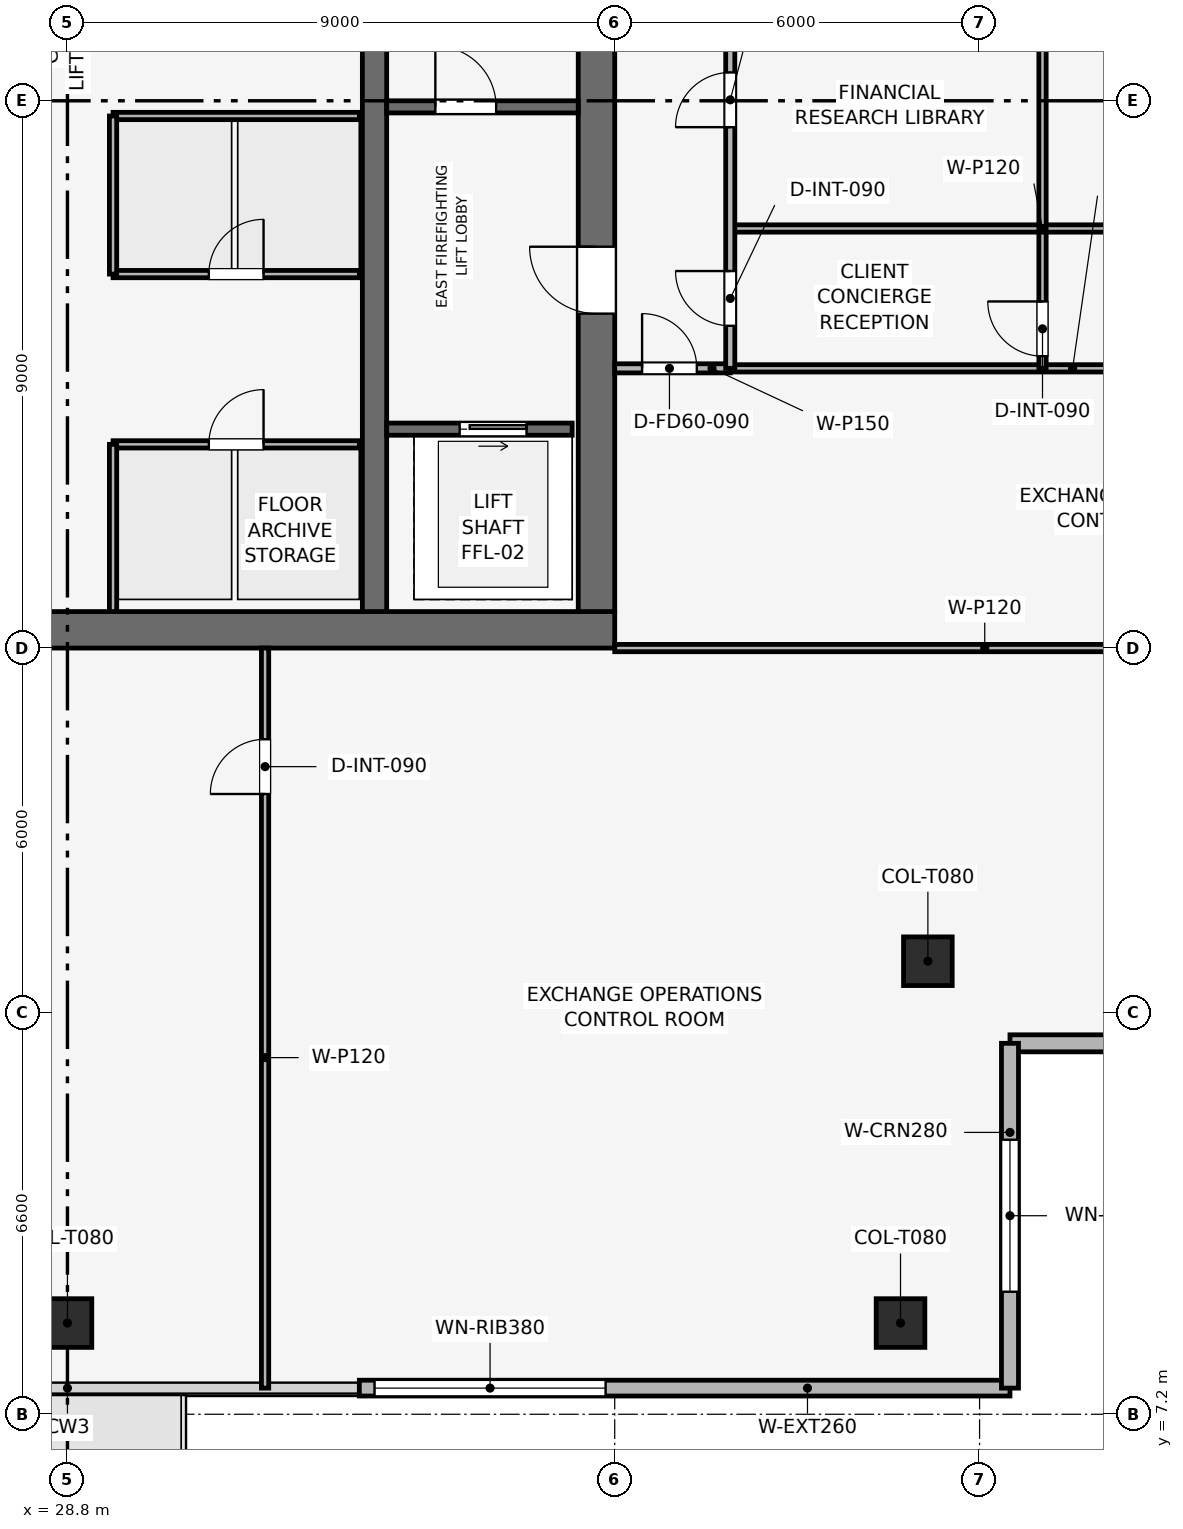
"""IFC4 building model, lengths in metres.
Left out: names, types, materials, properties, quantities, classifications, styles, units other than length and angle.
Written with IfcOpenShell. Run it as: python <this file> out.ifc"""

import sys

from ifc_helpers import new_model, si_unit, direction, frame, frame_2d, origin, origin_2d, place, context, subcontext, project, spatial, rectangle, extrude, element, fill, save


model = new_model("IFC4")
c1 = context("Model", 3, precision=1e-05, world=origin(), true_north=direction((0.0, 1.0)))
c2 = subcontext(c1, "Body", "Model", "MODEL_VIEW")
j1 = project(units=[si_unit("LENGTHUNIT", "METRE"), si_unit("PLANEANGLEUNIT", "RADIAN")], contexts=[c1])
p1 = place(None, origin())
s1 = spatial("IfcSite", under=j1, at=p1, CompositionType="ELEMENT")
p2 = place(p1, origin())
s2 = spatial("IfcBuilding", under=s1, at=p2, CompositionType="ELEMENT")
p3 = place(p2, frame((0.0, 0.0, 348.0)))
s3 = spatial("IfcBuildingStorey", under=s2, at=p3, CompositionType="ELEMENT", Elevation=348.0)
p4 = place(p3, frame((19.8, 20.1, 0.0), z_axis=(0.0, 0.0, 1.0), x_axis=(1.0, 0.0, 0.0)))
e1 = element("IfcWall", 1, at=p4, inside=s3, PredefinedType="SHEAR", context=c2, shape_type="SweptSolid", body=[
    extrude(rectangle(XDim=18.0, YDim=0.6, at=frame_2d((9.0, 0.0))), origin(), (0.0, 0.0, 1.0), 3.75),
])
p5 = place(p3, frame((37.5, 20.4, 0.0), z_axis=(0.0, 0.0, 1.0), x_axis=(0.0, 1.0, 0.0)))
e2 = element("IfcWall", 2, at=p5, inside=s3, PredefinedType="SHEAR", context=c2, shape_type="SweptSolid", body=[
    extrude(rectangle(XDim=16.8, YDim=0.6, at=frame_2d((8.4, 0.0))), origin(), (0.0, 0.0, 1.0), 3.75),
])
p6 = place(p5, frame((4.9, 0.0, 0.0)))
e3 = element("IfcOpeningElement", 3, at=p6, cuts=e2, PredefinedType="OPENING", context=c2, shape_type="SweptSolid", body=[
    extrude(rectangle(XDim=1.1, YDim=2.15, at=frame_2d((0.55, 1.075))), frame((0.0, 0.31, 0.0), z_axis=(0.0, -1.0, 0.0), x_axis=(1.0, 0.0, 0.0)), (0.0, 0.0, 1.0), 0.62),
])
p7 = place(p3, frame((33.85, 20.4, 0.0), z_axis=(0.0, 0.0, 1.0), x_axis=(0.0, 1.0, 0.0)))
e4 = element("IfcWall", 4, at=p7, inside=s3, PredefinedType="SHEAR", context=c2, shape_type="SweptSolid", body=[
    extrude(rectangle(XDim=16.8, YDim=0.4, at=frame_2d((8.4, 0.0))), origin(), (0.0, 0.0, 1.0), 3.75),
])
for number, where, z_axis, x_axis in (
    (5, (28.8, 8.7, 0.003), (0.0, 0.0, 1.0), (1.0, 0.0, 0.0)),
    (6, (42.5, 8.7, 0.003), (0.0, 0.0, 1.0), (1.0, 0.0, 0.0)),
    (7, (42.95, 14.65, 0.003), (0.0, 0.0, 1.0), (1.0, 0.0, 0.0)),
):
    element("IfcColumn", number, at=place(p3, frame(where, z_axis=z_axis, x_axis=x_axis)), inside=s3, PredefinedType="COLUMN", context=c2, shape_type="SweptSolid", body=[
        extrude(rectangle(XDim=0.8, YDim=0.8, at=origin_2d()), origin(), (0.0, 0.0, 1.0), 3.504),
    ])
p8 = place(p3, frame((44.3, 7.63, 0.0), z_axis=(0.0, 0.0, 1.0), x_axis=(-1.0, 0.0, 0.0)))
e8 = element("IfcWall", 8, at=p8, inside=s3, PredefinedType="SOLIDWALL", context=c2, shape_type="SweptSolid", body=[
    extrude(rectangle(XDim=10.7, YDim=0.26, at=frame_2d((5.35, 0.0))), origin(), (0.0, 0.0, 1.0), 3.51),
])
p9 = place(p8, frame((6.65, 0.0, 0.9)))
e9 = element("IfcOpeningElement", 9, at=p9, cuts=e8, PredefinedType="OPENING", context=c2, shape_type="SweptSolid", body=[
    extrude(rectangle(XDim=3.8, YDim=1.9, at=frame_2d((1.9, 0.95))), frame((0.0, 0.14, 0.0), z_axis=(0.0, -1.0, 0.0), x_axis=(1.0, 0.0, 0.0)), (0.0, 0.0, 1.0), 0.28),
])
p10 = place(p3, frame((49.97, 13.3, 0.0), z_axis=(0.0, 0.0, 1.0), x_axis=(-1.0, 0.0, 0.0)))
e10 = element("IfcWall", 10, at=p10, inside=s3, PredefinedType="SOLIDWALL", context=c2, shape_type="SweptSolid", body=[
    extrude(rectangle(XDim=5.67, YDim=0.28, at=frame_2d((2.835, 0.0))), origin(), (0.0, 0.0, 1.0), 3.51),
])
p11 = place(p10, frame((1.585, 0.0, 0.9)))
e11 = element("IfcOpeningElement", 11, at=p11, cuts=e10, PredefinedType="OPENING", context=c2, shape_type="SweptSolid", body=[
    extrude(rectangle(XDim=2.5, YDim=1.9, at=frame_2d((1.25, 0.95))), frame((0.0, 0.15, 0.0), z_axis=(0.0, -1.0, 0.0), x_axis=(1.0, 0.0, 0.0)), (0.0, 0.0, 1.0), 0.3),
])
p12 = place(p3, frame((44.3, 13.3, 0.0), z_axis=(0.0, 0.0, 1.0), x_axis=(0.0, -1.0, 0.0)))
e12 = element("IfcWall", 12, at=p12, inside=s3, PredefinedType="SOLIDWALL", context=c2, shape_type="SweptSolid", body=[
    extrude(rectangle(XDim=5.67, YDim=0.28, at=frame_2d((2.835, 0.0))), origin(), (0.0, 0.0, 1.0), 3.51),
])
p13 = place(p12, frame((1.585, 0.0, 0.9)))
e13 = element("IfcOpeningElement", 13, at=p13, cuts=e12, PredefinedType="OPENING", context=c2, shape_type="SweptSolid", body=[
    extrude(rectangle(XDim=2.5, YDim=1.9, at=frame_2d((1.25, 0.95))), frame((0.0, 0.15, 0.0), z_axis=(0.0, -1.0, 0.0), x_axis=(1.0, 0.0, 0.0)), (0.0, 0.0, 1.0), 0.3),
])
p14 = place(p3, frame((34.05, 28.7, 0.0), z_axis=(0.0, 0.0, 1.0), x_axis=(1.0, 0.0, 0.0)))
e14 = element("IfcWall", 14, at=p14, inside=s3, PredefinedType="SHEAR", context=c2, shape_type="SweptSolid", body=[
    extrude(rectangle(XDim=3.15, YDim=0.2, at=frame_2d((1.575, 0.0))), origin(), (0.0, 0.0, 1.0), 3.51),
])
p15 = place(p14, frame((0.8, 0.0, 0.0)))
e15 = element("IfcOpeningElement", 15, at=p15, cuts=e14, PredefinedType="OPENING", context=c2, shape_type="SweptSolid", body=[
    extrude(rectangle(XDim=1.0, YDim=2.1, at=frame_2d((0.5, 1.05))), frame((0.0, 0.11, 0.0), z_axis=(0.0, -1.0, 0.0), x_axis=(1.0, 0.0, 0.0)), (0.0, 0.0, 1.0), 0.22),
])
p16 = place(p3, frame((34.05, 23.4, 0.0), z_axis=(0.0, 0.0, 1.0), x_axis=(1.0, 0.0, 0.0)))
e16 = element("IfcWall", 16, at=p16, inside=s3, PredefinedType="SHEAR", context=c2, shape_type="SweptSolid", body=[
    extrude(rectangle(XDim=3.05, YDim=0.2, at=frame_2d((1.525, 0.0))), origin(), (0.0, 0.0, 1.0), 3.51),
])
p17 = place(p16, frame((1.2, 0.0, 0.0)))
e17 = element("IfcOpeningElement", 17, at=p17, cuts=e16, PredefinedType="OPENING", context=c2, shape_type="SweptSolid", body=[
    extrude(rectangle(XDim=1.1, YDim=2.15, at=frame_2d((0.55, 1.075))), frame((0.0, 0.11, 0.0), z_axis=(0.0, -1.0, 0.0), x_axis=(1.0, 0.0, 0.0)), (0.0, 0.0, 1.0), 0.22),
])
p18 = place(p3, frame((29.55, 23.15, 0.0), z_axis=(0.0, 0.0, 1.0), x_axis=(1.0, 0.0, 0.0)))
e18 = element("IfcWall", 18, at=p18, inside=s3, PredefinedType="PARTITIONING", context=c2, shape_type="SweptSolid", body=[
    extrude(rectangle(XDim=4.05, YDim=0.12, at=frame_2d((2.025, 0.0))), origin(), (0.0, 0.0, 1.0), 3.51),
])
p19 = place(p18, frame((1.575, 0.0, 0.0)))
e19 = element("IfcOpeningElement", 19, at=p19, cuts=e18, PredefinedType="OPENING", context=c2, shape_type="SweptSolid", body=[
    extrude(rectangle(XDim=0.9, YDim=2.1, at=frame_2d((0.45, 1.05))), frame((0.0, 0.07, 0.0), z_axis=(0.0, -1.0, 0.0), x_axis=(1.0, 0.0, 0.0)), (0.0, 0.0, 1.0), 0.14),
])
p20 = place(p3, frame((29.55, 20.4, 0.0), z_axis=(0.0, 0.0, 1.0), x_axis=(0.0, 1.0, 0.0)))
e20 = element("IfcWall", 20, at=p20, inside=s3, PredefinedType="PARTITIONING", context=c2, shape_type="SweptSolid", body=[
    extrude(rectangle(XDim=2.75, YDim=0.12, at=frame_2d((1.375, 0.0))), origin(), (0.0, 0.0, 1.0), 3.51),
])
p21 = place(p3, frame((29.55, 25.95, 0.0), z_axis=(0.0, 0.0, 1.0), x_axis=(1.0, 0.0, 0.0)))
e21 = element("IfcWall", 21, at=p21, inside=s3, PredefinedType="PARTITIONING", context=c2, shape_type="SweptSolid", body=[
    extrude(rectangle(XDim=4.05, YDim=0.12, at=frame_2d((2.025, 0.0))), origin(), (0.0, 0.0, 1.0), 3.51),
])
p22 = place(p21, frame((1.575, 0.0, 0.0)))
e22 = element("IfcOpeningElement", 22, at=p22, cuts=e21, PredefinedType="OPENING", context=c2, shape_type="SweptSolid", body=[
    extrude(rectangle(XDim=0.9, YDim=2.1, at=frame_2d((0.45, 1.05))), frame((0.0, 0.07, 0.0), z_axis=(0.0, -1.0, 0.0), x_axis=(1.0, 0.0, 0.0)), (0.0, 0.0, 1.0), 0.14),
])
p23 = place(p3, frame((29.55, 28.55, 0.0), z_axis=(0.0, 0.0, 1.0), x_axis=(1.0, 0.0, 0.0)))
e23 = element("IfcWall", 23, at=p23, inside=s3, PredefinedType="PARTITIONING", context=c2, shape_type="SweptSolid", body=[
    extrude(rectangle(XDim=4.05, YDim=0.12, at=frame_2d((2.025, 0.0))), origin(), (0.0, 0.0, 1.0), 3.51),
])
p24 = place(p3, frame((29.55, 25.95, 0.0), z_axis=(0.0, 0.0, 1.0), x_axis=(0.0, 1.0, 0.0)))
e24 = element("IfcWall", 24, at=p24, inside=s3, PredefinedType="PARTITIONING", context=c2, shape_type="SweptSolid", body=[
    extrude(rectangle(XDim=2.6, YDim=0.12, at=frame_2d((1.3, 0.0))), origin(), (0.0, 0.0, 1.0), 3.51),
])
p25 = place(p3, frame((32.05, 7.63, 0.0), z_axis=(0.0, 0.0, 1.0), x_axis=(0.0, 1.0, 0.0)))
e25 = element("IfcWall", 25, at=p25, inside=s3, PredefinedType="PARTITIONING", context=c2, shape_type="SweptSolid", body=[
    extrude(rectangle(XDim=12.17, YDim=0.12, at=frame_2d((6.085, 0.0))), origin(), (0.0, 0.0, 1.0), 3.135),
])
p26 = place(p25, frame((9.77, 0.0, 0.0)))
e26 = element("IfcOpeningElement", 26, at=p26, cuts=e25, PredefinedType="OPENING", context=c2, shape_type="SweptSolid", body=[
    extrude(rectangle(XDim=0.9, YDim=2.1, at=frame_2d((0.45, 1.05))), frame((0.0, 0.07, 0.0), z_axis=(0.0, -1.0, 0.0), x_axis=(1.0, 0.0, 0.0)), (0.0, 0.0, 1.0), 0.14),
])
p27 = place(p3, frame((37.8, 19.8, 0.0), z_axis=(0.0, 0.0, 1.0), x_axis=(1.0, 0.0, 0.0)))
e27 = element("IfcWall", 27, at=p27, inside=s3, PredefinedType="PARTITIONING", context=c2, shape_type="SweptSolid", body=[
    extrude(rectangle(XDim=12.17, YDim=0.12, at=frame_2d((6.085, 0.0))), origin(), (0.0, 0.0, 1.0), 3.095),
])
p28 = place(p3, frame((37.8, 24.4, 0.0), z_axis=(0.0, 0.0, 1.0), x_axis=(1.0, 0.0, 0.0)))
e28 = element("IfcWall", 28, at=p28, inside=s3, PredefinedType="PARTITIONING", context=c2, shape_type="SweptSolid", body=[
    extrude(rectangle(XDim=1.9, YDim=0.15, at=frame_2d((0.95, 0.0))), origin(), (0.0, 0.0, 1.0), 3.51),
])
p29 = place(p28, frame((0.45, 0.0, 0.0)))
e29 = element("IfcOpeningElement", 29, at=p29, cuts=e28, PredefinedType="OPENING", context=c2, shape_type="SweptSolid", body=[
    extrude(rectangle(XDim=0.9, YDim=2.1, at=frame_2d((0.45, 1.05))), frame((0.0, 0.085, 0.0), z_axis=(0.0, -1.0, 0.0), x_axis=(1.0, 0.0, 0.0)), (0.0, 0.0, 1.0), 0.17),
])
p30 = place(p3, frame((39.7, 24.4, 0.0), z_axis=(0.0, 0.0, 1.0), x_axis=(1.0, 0.0, 0.0)))
e30 = element("IfcWall", 30, at=p30, inside=s3, PredefinedType="PARTITIONING", context=c2, shape_type="SweptSolid", body=[
    extrude(rectangle(XDim=10.27, YDim=0.12, at=frame_2d((5.135, 0.0))), origin(), (0.0, 0.0, 1.0), 3.135),
])
p31 = place(p3, frame((44.835, 24.4, 0.0), z_axis=(0.0, 0.0, 1.0), x_axis=(0.0, 1.0, 0.0)))
e31 = element("IfcWall", 31, at=p31, inside=s3, PredefinedType="PARTITIONING", context=c2, shape_type="SweptSolid", body=[
    extrude(rectangle(XDim=2.3, YDim=0.12, at=frame_2d((1.15, 0.0))), origin(), (0.0, 0.0, 1.0), 3.51),
])
p32 = place(p31, frame((0.2, 0.0, 0.0)))
e32 = element("IfcOpeningElement", 32, at=p32, cuts=e31, PredefinedType="OPENING", context=c2, shape_type="SweptSolid", body=[
    extrude(rectangle(XDim=0.9, YDim=2.1, at=frame_2d((0.45, 1.05))), frame((0.0, 0.07, 0.0), z_axis=(0.0, -1.0, 0.0), x_axis=(1.0, 0.0, 0.0)), (0.0, 0.0, 1.0), 0.14),
])
p33 = place(p3, frame((39.7, 26.7, 0.0), z_axis=(0.0, 0.0, 1.0), x_axis=(1.0, 0.0, 0.0)))
e33 = element("IfcWall", 33, at=p33, inside=s3, PredefinedType="PARTITIONING", context=c2, shape_type="SweptSolid", body=[
    extrude(rectangle(XDim=10.27, YDim=0.12, at=frame_2d((5.135, 0.0))), origin(), (0.0, 0.0, 1.0), 3.135),
])
p34 = place(p3, frame((44.835, 26.7, 0.0), z_axis=(0.0, 0.0, 1.0), x_axis=(0.0, 1.0, 0.0)))
e34 = element("IfcWall", 34, at=p34, inside=s3, PredefinedType="PARTITIONING", context=c2, shape_type="SweptSolid", body=[
    extrude(rectangle(XDim=4.231, YDim=0.12, at=frame_2d((2.115, 0.0))), origin(), (0.0, 0.0, 1.0), 3.095),
])
p35 = place(p34, frame((3.131, 0.0, 0.0)))
e35 = element("IfcOpeningElement", 35, at=p35, cuts=e34, PredefinedType="OPENING", context=c2, shape_type="SweptSolid", body=[
    extrude(rectangle(XDim=0.9, YDim=2.1, at=frame_2d((0.45, 1.05))), frame((0.0, 0.07, 0.0), z_axis=(0.0, -1.0, 0.0), x_axis=(1.0, 0.0, 0.0)), (0.0, 0.0, 1.0), 0.14),
])
p36 = place(p3, frame((39.7, 24.4, 0.0), z_axis=(0.0, 0.0, 1.0), x_axis=(0.0, 1.0, 0.0)))
e36 = element("IfcWall", 36, at=p36, inside=s3, PredefinedType="PARTITIONING", context=c2, shape_type="SweptSolid", body=[
    extrude(rectangle(XDim=15.3, YDim=0.15, at=frame_2d((7.65, 0.0))), origin(), (0.0, 0.0, 1.0), 3.095),
])
p37 = place(p36, frame((0.7, 0.0, 0.0)))
e37 = element("IfcOpeningElement", 37, at=p37, cuts=e36, PredefinedType="OPENING", context=c2, shape_type="SweptSolid", body=[
    extrude(rectangle(XDim=0.9, YDim=2.1, at=frame_2d((0.45, 1.05))), frame((0.0, 0.085, 0.0), z_axis=(0.0, -1.0, 0.0), x_axis=(1.0, 0.0, 0.0)), (0.0, 0.0, 1.0), 0.17),
])
p38 = place(p36, frame((3.966, 0.0, 0.0)))
e38 = element("IfcOpeningElement", 38, at=p38, cuts=e36, PredefinedType="OPENING", context=c2, shape_type="SweptSolid", body=[
    extrude(rectangle(XDim=0.9, YDim=2.1, at=frame_2d((0.45, 1.05))), frame((0.0, 0.085, 0.0), z_axis=(0.0, -1.0, 0.0), x_axis=(1.0, 0.0, 0.0)), (0.0, 0.0, 1.0), 0.17),
])
p39 = place(p36, frame((10.465, 0.0, 0.0)))
e39 = element("IfcOpeningElement", 39, at=p39, cuts=e36, PredefinedType="OPENING", context=c2, shape_type="SweptSolid", body=[
    extrude(rectangle(XDim=0.9, YDim=2.1, at=frame_2d((0.45, 1.05))), frame((0.0, 0.085, 0.0), z_axis=(0.0, -1.0, 0.0), x_axis=(1.0, 0.0, 0.0)), (0.0, 0.0, 1.0), 0.17),
])
p40 = place(p9, origin())
e40 = element("IfcWindow", 40, at=p40, inside=s3, PartitioningType="SINGLE_PANEL", PredefinedType="WINDOW", context=c2, shape_type="SweptSolid", body=[
    extrude(rectangle(XDim=3.8, YDim=1.9, at=frame_2d((1.9, 0.95))), frame((0.0, 0.03, 0.0), z_axis=(0.0, -1.0, 0.0), x_axis=(1.0, 0.0, 0.0)), (0.0, 0.0, 1.0), 0.06),
])
fill(e9, e40)
p41 = place(p13, origin())
e41 = element("IfcWindow", 41, at=p41, inside=s3, PartitioningType="SINGLE_PANEL", PredefinedType="WINDOW", context=c2, shape_type="SweptSolid", body=[
    extrude(rectangle(XDim=2.5, YDim=1.9, at=frame_2d((1.25, 0.95))), frame((0.0, 0.03, 0.0), z_axis=(0.0, -1.0, 0.0), x_axis=(1.0, 0.0, 0.0)), (0.0, 0.0, 1.0), 0.06),
])
fill(e13, e41)
p42 = place(p15, origin())
e42 = element("IfcDoor", 42, at=p42, inside=s3, OperationType="SINGLE_SWING_LEFT", PredefinedType="DOOR", context=c2, shape_type="SweptSolid", body=[
    extrude(rectangle(XDim=1.0, YDim=2.1, at=frame_2d((0.5, 1.05))), frame((0.0, 0.025, 0.0), z_axis=(0.0, -1.0, 0.0), x_axis=(1.0, 0.0, 0.0)), (0.0, 0.0, 1.0), 0.05),
])
fill(e15, e42)
p43 = place(p17, origin())
e43 = element("IfcDoor", 43, at=p43, inside=s3, OperationType="SLIDING_TO_RIGHT", PredefinedType="DOOR", context=c2, shape_type="SweptSolid", body=[
    extrude(rectangle(XDim=1.1, YDim=2.15, at=frame_2d((0.55, 1.075))), frame((0.0, 0.025, 0.0), z_axis=(0.0, -1.0, 0.0), x_axis=(1.0, 0.0, 0.0)), (0.0, 0.0, 1.0), 0.05),
])
fill(e17, e43)
p44 = place(p19, origin())
e44 = element("IfcDoor", 44, at=p44, inside=s3, OperationType="SINGLE_SWING_RIGHT", PredefinedType="DOOR", context=c2, shape_type="SweptSolid", body=[
    extrude(rectangle(XDim=0.9, YDim=2.1, at=frame_2d((0.45, 1.05))), frame((0.0, 0.025, 0.0), z_axis=(0.0, -1.0, 0.0), x_axis=(1.0, 0.0, 0.0)), (0.0, 0.0, 1.0), 0.05),
])
fill(e19, e44)
p45 = place(p22, origin())
e45 = element("IfcDoor", 45, at=p45, inside=s3, OperationType="SINGLE_SWING_RIGHT", PredefinedType="DOOR", context=c2, shape_type="SweptSolid", body=[
    extrude(rectangle(XDim=0.9, YDim=2.1, at=frame_2d((0.45, 1.05))), frame((0.0, 0.025, 0.0), z_axis=(0.0, -1.0, 0.0), x_axis=(1.0, 0.0, 0.0)), (0.0, 0.0, 1.0), 0.05),
])
fill(e22, e45)
p46 = place(p26, origin())
e46 = element("IfcDoor", 46, at=p46, inside=s3, OperationType="SINGLE_SWING_LEFT", PredefinedType="DOOR", context=c2, shape_type="SweptSolid", body=[
    extrude(rectangle(XDim=0.9, YDim=2.1, at=frame_2d((0.45, 1.05))), frame((0.0, 0.025, 0.0), z_axis=(0.0, -1.0, 0.0), x_axis=(1.0, 0.0, 0.0)), (0.0, 0.0, 1.0), 0.05),
])
fill(e26, e46)
p47 = place(p29, origin())
e47 = element("IfcDoor", 47, at=p47, inside=s3, OperationType="SINGLE_SWING_LEFT", PredefinedType="DOOR", context=c2, shape_type="SweptSolid", body=[
    extrude(rectangle(XDim=0.9, YDim=2.1, at=frame_2d((0.45, 1.05))), frame((0.0, 0.025, 0.0), z_axis=(0.0, -1.0, 0.0), x_axis=(1.0, 0.0, 0.0)), (0.0, 0.0, 1.0), 0.05),
])
fill(e29, e47)
p48 = place(p32, origin())
e48 = element("IfcDoor", 48, at=p48, inside=s3, OperationType="SINGLE_SWING_RIGHT", PredefinedType="DOOR", context=c2, shape_type="SweptSolid", body=[
    extrude(rectangle(XDim=0.9, YDim=2.1, at=frame_2d((0.45, 1.05))), frame((0.0, 0.025, 0.0), z_axis=(0.0, -1.0, 0.0), x_axis=(1.0, 0.0, 0.0)), (0.0, 0.0, 1.0), 0.05),
])
fill(e32, e48)
p49 = place(p37, origin())
e49 = element("IfcDoor", 49, at=p49, inside=s3, OperationType="SINGLE_SWING_RIGHT", PredefinedType="DOOR", context=c2, shape_type="SweptSolid", body=[
    extrude(rectangle(XDim=0.9, YDim=2.1, at=frame_2d((0.45, 1.05))), frame((0.0, 0.025, 0.0), z_axis=(0.0, -1.0, 0.0), x_axis=(1.0, 0.0, 0.0)), (0.0, 0.0, 1.0), 0.05),
])
fill(e37, e49)
p50 = place(p38, origin())
e50 = element("IfcDoor", 50, at=p50, inside=s3, OperationType="SINGLE_SWING_LEFT", PredefinedType="DOOR", context=c2, shape_type="SweptSolid", body=[
    extrude(rectangle(XDim=0.9, YDim=2.1, at=frame_2d((0.45, 1.05))), frame((0.0, 0.025, 0.0), z_axis=(0.0, -1.0, 0.0), x_axis=(1.0, 0.0, 0.0)), (0.0, 0.0, 1.0), 0.05),
])
fill(e38, e50)
p51 = place(p6, origin())
e51 = element("IfcDoor", 51, at=p51, inside=s3, OperationType="SINGLE_SWING_RIGHT", PredefinedType="DOOR", context=c2, shape_type="SweptSolid", body=[
    extrude(rectangle(XDim=1.1, YDim=2.15, at=frame_2d((0.55, 1.075))), frame((0.0, 0.025, 0.0), z_axis=(0.0, -1.0, 0.0), x_axis=(1.0, 0.0, 0.0)), (0.0, 0.0, 1.0), 0.05),
])
fill(e3, e51)
save(model, sys.argv[1])
